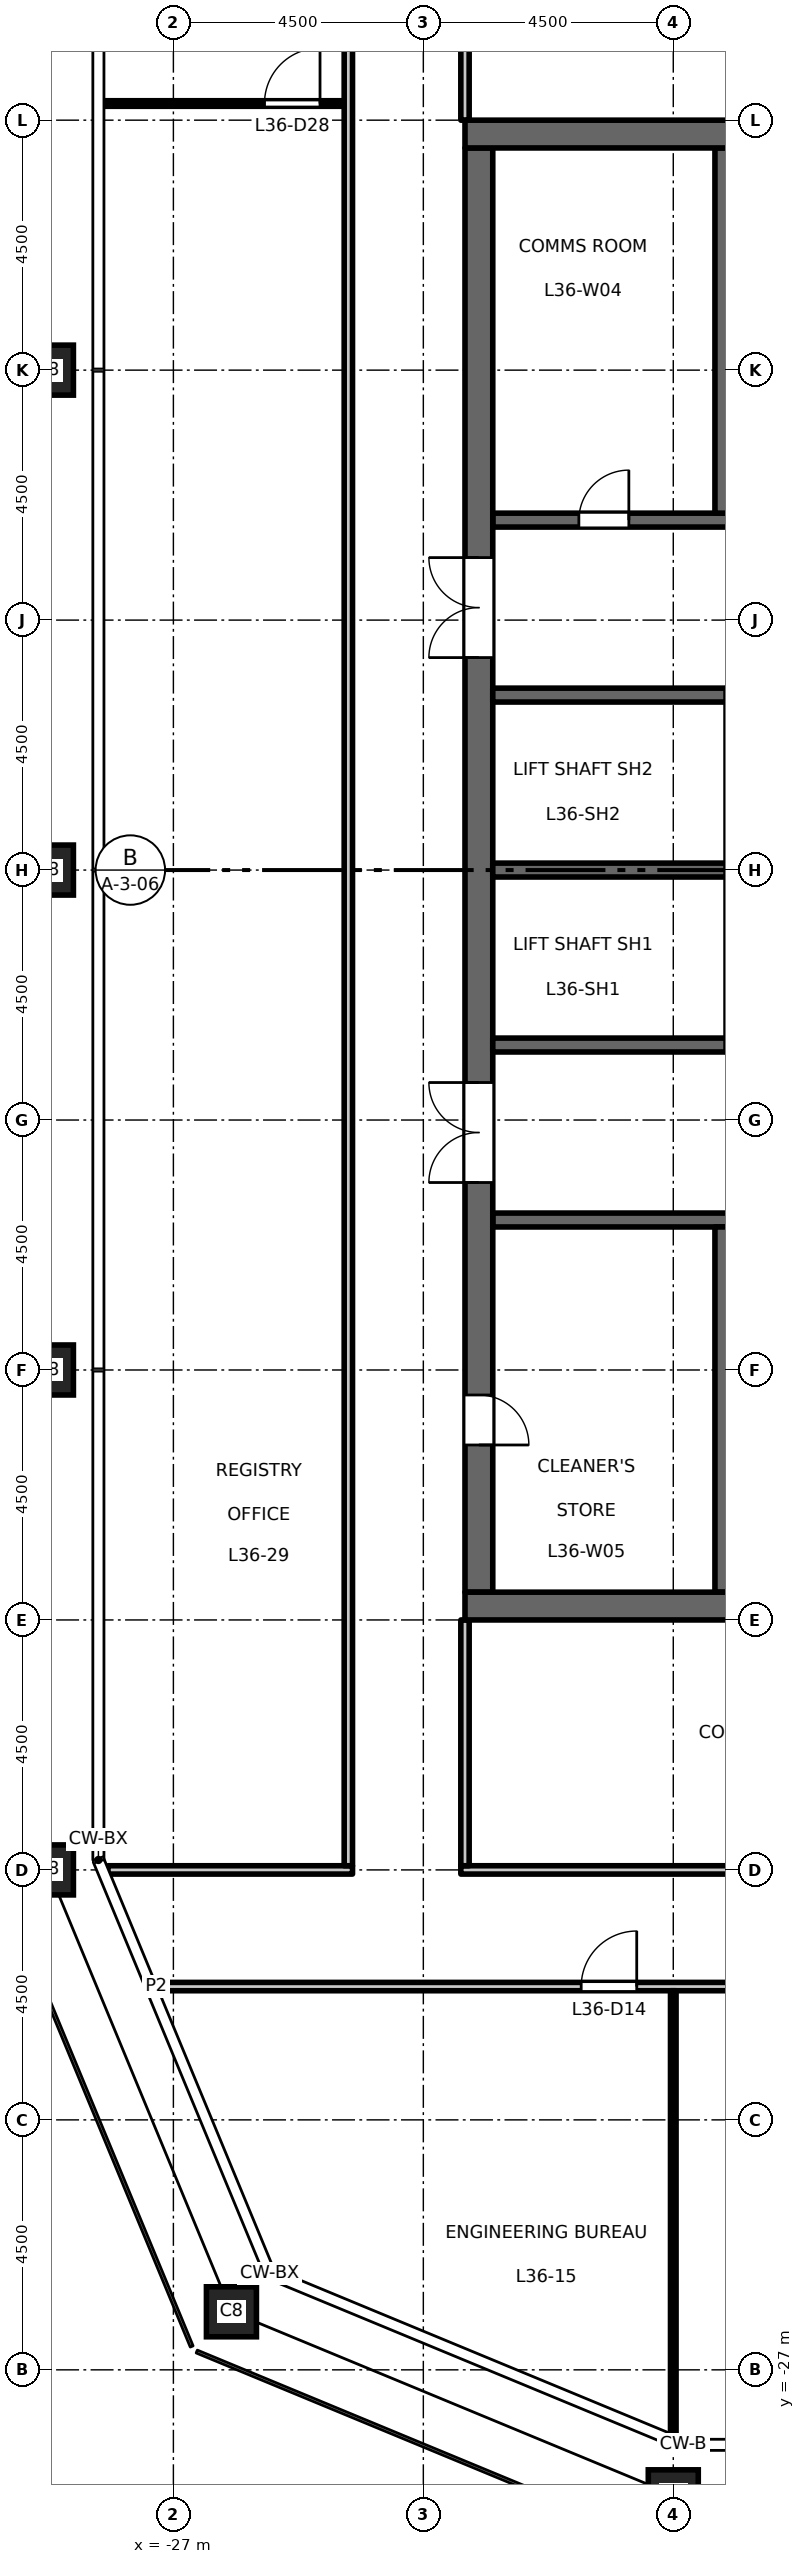
"""IFC4 building model, lengths in metres.
Left out: names, types, materials, properties, quantities, classifications, styles, units other than length and angle.
Written with IfcOpenShell. Run it as: python <this file> out.ifc"""

import sys

from ifc_helpers import new_model, si_unit, direction, frame, frame_2d, origin, origin_2d, place, context, subcontext, project, spatial, rectangle, hollow_rectangle, extrude, element, fill, save


model = new_model("IFC4")
c1 = context("Model", 3, precision=1e-05, world=origin(), true_north=direction((0.0, 1.0)))
c2 = subcontext(c1, "Body", "Model", "MODEL_VIEW")
j1 = project(units=[si_unit("LENGTHUNIT", "METRE"), si_unit("PLANEANGLEUNIT", "RADIAN")], contexts=[c1])
p1 = place(None, origin())
s1 = spatial("IfcSite", under=j1, at=p1, CompositionType="ELEMENT")
p2 = place(p1, origin())
s2 = spatial("IfcBuilding", under=s1, at=p2, CompositionType="ELEMENT")
p3 = place(p2, frame((0.0, 0.0, 167.7)))
s3 = spatial("IfcBuildingStorey", under=s2, at=p3, CompositionType="ELEMENT", Elevation=167.7)
for number, where, z_axis, x_axis in (
    (1, (-18.0, -29.25, 0.0), (0.0, 0.0, 1.0), (1.0, 0.0, 0.0)),
    (2, (-29.25, 9.0, 0.0), (0.0, 0.0, 1.0), (1.0, 0.0, 0.0)),
    (3, (-29.25, 0.0, 0.0), (0.0, 0.0, 1.0), (1.0, 0.0, 0.0)),
    (4, (-29.25, -9.0, 0.0), (0.0, 0.0, 1.0), (1.0, 0.0, 0.0)),
    (5, (-29.25, -18.0, 0.0), (0.0, 0.0, 1.0), (1.0, 0.0, 0.0)),
    (6, (-25.955, -25.955, 0.0), (0.0, 0.0, 1.0), (1.0, 0.0, 0.0)),
):
    element("IfcColumn", number, at=place(p3, frame(where, z_axis=z_axis, x_axis=x_axis)), inside=s3, PredefinedType="COLUMN", context=c2, shape_type="SweptSolid", body=[
        extrude(hollow_rectangle(XDim=0.9, YDim=0.9, WallThickness=0.05, at=origin_2d()), origin(), (0.0, 0.0, 1.0), 4.5),
    ])
p4 = place(p3, frame((-17.0, 6.3, 0.0), z_axis=(0.0, 0.0, 1.0), x_axis=(-1.0, 0.0, 0.0)))
e7 = element("IfcWall", 7, at=p4, inside=s3, PredefinedType="SHEAR", context=c2, shape_type="SweptSolid", body=[
    extrude(rectangle(XDim=4.25, YDim=0.25, at=frame_2d((2.125, 0.0))), origin(), (0.0, 0.0, 1.0), 4.35),
])
p5 = place(p4, frame((1.8, 0.0, 0.0)))
e8 = element("IfcOpeningElement", 8, at=p5, cuts=e7, PredefinedType="OPENING", context=c2, shape_type="SweptSolid", body=[
    extrude(rectangle(XDim=0.9, YDim=2.1, at=frame_2d((0.45, 1.05))), frame((0.0, 0.135, 0.0), z_axis=(0.0, -1.0, 0.0), x_axis=(1.0, 0.0, 0.0)), (0.0, 0.0, 1.0), 0.27),
])
p6 = place(p3, frame((-12.15, -6.3, 0.0), z_axis=(0.0, 0.0, 1.0), x_axis=(-1.0, 0.0, 0.0)))
e9 = element("IfcWall", 9, at=p6, inside=s3, PredefinedType="SHEAR", context=c2, shape_type="SweptSolid", body=[
    extrude(rectangle(XDim=9.1, YDim=0.25, at=frame_2d((4.55, 0.0))), origin(), (0.0, 0.0, 1.0), 4.35),
])
p7 = place(p6, frame((1.8, 0.0, 0.0)))
e10 = element("IfcOpeningElement", 10, at=p7, cuts=e9, PredefinedType="OPENING", context=c2, shape_type="SweptSolid", body=[
    extrude(rectangle(XDim=1.0, YDim=2.1, at=frame_2d((0.5, 1.05))), frame((0.0, 0.135, 0.0), z_axis=(0.0, -1.0, 0.0), x_axis=(1.0, 0.0, 0.0)), (0.0, 0.0, 1.0), 0.27),
])
p8 = place(p3, frame((-21.5, -13.0, 0.0), z_axis=(0.0, 0.0, 1.0), x_axis=(0.0, 1.0, 0.0)))
e11 = element("IfcWall", 11, at=p8, inside=s3, PredefinedType="SHEAR", context=c2, shape_type="SweptSolid", body=[
    extrude(rectangle(XDim=26.0, YDim=0.5, at=frame_2d((13.0, 0.0))), origin(), (0.0, 0.0, 1.0), 4.35),
])
p9 = place(p8, frame((16.825, 0.0, 0.0)))
e12 = element("IfcOpeningElement", 12, at=p9, cuts=e11, PredefinedType="OPENING", context=c2, shape_type="SweptSolid", body=[
    extrude(rectangle(XDim=1.8, YDim=2.1, at=frame_2d((0.9, 1.05))), frame((0.0, 0.26, 0.0), z_axis=(0.0, -1.0, 0.0), x_axis=(1.0, 0.0, 0.0)), (0.0, 0.0, 1.0), 0.52),
])
p10 = place(p8, frame((7.375, 0.0, 0.0)))
e13 = element("IfcOpeningElement", 13, at=p10, cuts=e11, PredefinedType="OPENING", context=c2, shape_type="SweptSolid", body=[
    extrude(rectangle(XDim=1.8, YDim=2.1, at=frame_2d((0.9, 1.05))), frame((0.0, 0.26, 0.0), z_axis=(0.0, -1.0, 0.0), x_axis=(1.0, 0.0, 0.0)), (0.0, 0.0, 1.0), 0.52),
])
p11 = place(p8, frame((2.65, 0.0, 0.0)))
e14 = element("IfcOpeningElement", 14, at=p11, cuts=e11, PredefinedType="OPENING", context=c2, shape_type="SweptSolid", body=[
    extrude(rectangle(XDim=0.9, YDim=2.1, at=frame_2d((0.45, 1.05))), frame((0.0, 0.26, 0.0), z_axis=(0.0, -1.0, 0.0), x_axis=(1.0, 0.0, 0.0)), (0.0, 0.0, 1.0), 0.52),
])
for number, where, z_axis, x_axis in (
    (15, (-17.05, 0.0, 0.0), (0.0, 0.0, 1.0), (-1.0, 0.0, 0.0)),
    (16, (-17.05, 3.15, 0.0), (0.0, 0.0, 1.0), (-1.0, 0.0, 0.0)),
    (17, (-17.05, -3.15, 0.0), (0.0, 0.0, 1.0), (-1.0, 0.0, 0.0)),
):
    element("IfcWall", number, at=place(p3, frame(where, z_axis=z_axis, x_axis=x_axis)), inside=s3, PredefinedType="SHEAR", context=c2, shape_type="SweptSolid", body=[
        extrude(rectangle(XDim=4.2, YDim=0.25, at=frame_2d((2.1, 0.0))), origin(), (0.0, 0.0, 1.0), 4.35),
    ])
for number, where, z_axis, x_axis in (
    (18, (-17.0, 6.425, 0.0), (0.0, 0.0, 1.0), (0.0, 1.0, 0.0)),
    (19, (-17.0, -13.0, 0.0), (0.0, 0.0, 1.0), (0.0, 1.0, 0.0)),
):
    element("IfcWall", number, at=place(p3, frame(where, z_axis=z_axis, x_axis=x_axis)), inside=s3, PredefinedType="SHEAR", context=c2, shape_type="SweptSolid", body=[
        extrude(rectangle(XDim=6.575, YDim=0.5, at=frame_2d((3.288, 0.0))), origin(), (0.0, 0.0, 1.0), 4.35),
    ])
for number, where, z_axis, x_axis in (
    (20, (-8.25, 13.25, 0.0), (0.0, 0.0, 1.0), (-1.0, 0.0, 0.0)),
    (21, (-8.25, -13.25, 0.0), (0.0, 0.0, 1.0), (-1.0, 0.0, 0.0)),
):
    element("IfcWall", number, at=place(p3, frame(where, z_axis=z_axis, x_axis=x_axis)), inside=s3, PredefinedType="SHEAR", context=c2, shape_type="SweptSolid", body=[
        extrude(rectangle(XDim=13.5, YDim=0.5, at=frame_2d((6.75, 0.0))), origin(), (0.0, 0.0, 1.0), 4.35),
    ])
p12 = place(p3, frame((-27.308, -20.1, 0.0), z_axis=(0.0, 0.0, 1.0), x_axis=(1.0, 0.0, 0.0)))
e22 = element("IfcWall", 22, at=p12, inside=s3, PredefinedType="PARTITIONING", context=c2, shape_type="SweptSolid", body=[
    extrude(rectangle(XDim=54.616, YDim=0.15, at=frame_2d((27.308, 0.0))), origin(), (0.0, 0.0, 1.0), 4.35),
])
p13 = place(p12, frame((16.708, 0.0, 0.0)))
e23 = element("IfcOpeningElement", 23, at=p13, cuts=e22, PredefinedType="OPENING", context=c2, shape_type="SweptSolid", body=[
    extrude(rectangle(XDim=1.0, YDim=2.1, at=frame_2d((0.5, 1.05))), frame((0.0, 0.085, 0.0), z_axis=(0.0, -1.0, 0.0), x_axis=(1.0, 0.0, 0.0)), (0.0, 0.0, 1.0), 0.17),
])
p14 = place(p12, frame((18.958, 0.0, 0.0)))
e24 = element("IfcOpeningElement", 24, at=p14, cuts=e22, PredefinedType="OPENING", context=c2, shape_type="SweptSolid", body=[
    extrude(rectangle(XDim=1.0, YDim=2.1, at=frame_2d((0.5, 1.05))), frame((0.0, 0.085, 0.0), z_axis=(0.0, -1.0, 0.0), x_axis=(1.0, 0.0, 0.0)), (0.0, 0.0, 1.0), 0.17),
])
p15 = place(p12, frame((34.708, 0.0, 0.0)))
e25 = element("IfcOpeningElement", 25, at=p15, cuts=e22, PredefinedType="OPENING", context=c2, shape_type="SweptSolid", body=[
    extrude(rectangle(XDim=1.0, YDim=2.1, at=frame_2d((0.5, 1.05))), frame((0.0, 0.085, 0.0), z_axis=(0.0, -1.0, 0.0), x_axis=(1.0, 0.0, 0.0)), (0.0, 0.0, 1.0), 0.17),
])
p16 = place(p12, frame((43.708, 0.0, 0.0)))
e26 = element("IfcOpeningElement", 26, at=p16, cuts=e22, PredefinedType="OPENING", context=c2, shape_type="SweptSolid", body=[
    extrude(rectangle(XDim=1.0, YDim=2.1, at=frame_2d((0.5, 1.05))), frame((0.0, 0.085, 0.0), z_axis=(0.0, -1.0, 0.0), x_axis=(1.0, 0.0, 0.0)), (0.0, 0.0, 1.0), 0.17),
])
p17 = place(p12, frame((7.65, 0.0, 0.0)))
e27 = element("IfcOpeningElement", 27, at=p17, cuts=e22, PredefinedType="OPENING", context=c2, shape_type="SweptSolid", body=[
    extrude(rectangle(XDim=1.0, YDim=2.1, at=frame_2d((0.5, 1.05))), frame((0.0, 0.085, 0.0), z_axis=(0.0, -1.0, 0.0), x_axis=(1.0, 0.0, 0.0)), (0.0, 0.0, 1.0), 0.17),
])
p18 = place(p12, frame((45.958, 0.0, 0.0)))
e28 = element("IfcOpeningElement", 28, at=p18, cuts=e22, PredefinedType="OPENING", context=c2, shape_type="SweptSolid", body=[
    extrude(rectangle(XDim=1.0, YDim=2.1, at=frame_2d((0.5, 1.05))), frame((0.0, 0.085, 0.0), z_axis=(0.0, -1.0, 0.0), x_axis=(1.0, 0.0, 0.0)), (0.0, 0.0, 1.0), 0.17),
])
p19 = place(p3, frame((-28.178, -18.0, 0.0), z_axis=(0.0, 0.0, 1.0), x_axis=(1.0, 0.0, 0.0)))
e29 = element("IfcWall", 29, at=p19, inside=s3, PredefinedType="PARTITIONING", context=c2, shape_type="SweptSolid", body=[
    extrude(rectangle(XDim=4.403, YDim=0.15, at=frame_2d((2.202, 0.0))), origin(), (0.0, 0.0, 1.0), 4.35),
])
p20 = place(p3, frame((-21.825, -18.0, 0.0), z_axis=(0.0, 0.0, 1.0), x_axis=(1.0, 0.0, 0.0)))
e30 = element("IfcWall", 30, at=p20, inside=s3, PredefinedType="PARTITIONING", context=c2, shape_type="SweptSolid", body=[
    extrude(rectangle(XDim=43.65, YDim=0.15, at=frame_2d((21.825, 0.0))), origin(), (0.0, 0.0, 1.0), 4.35),
])
p21 = place(p20, frame((14.175, 0.0, 0.0)))
e31 = element("IfcOpeningElement", 31, at=p21, cuts=e30, PredefinedType="OPENING", context=c2, shape_type="SweptSolid", body=[
    extrude(rectangle(XDim=1.0, YDim=2.1, at=frame_2d((0.5, 1.05))), frame((0.0, 0.085, 0.0), z_axis=(0.0, -1.0, 0.0), x_axis=(1.0, 0.0, 0.0)), (0.0, 0.0, 1.0), 0.17),
])
p22 = place(p20, frame((11.925, 0.0, 0.0)))
e32 = element("IfcOpeningElement", 32, at=p22, cuts=e30, PredefinedType="OPENING", context=c2, shape_type="SweptSolid", body=[
    extrude(rectangle(XDim=1.0, YDim=2.1, at=frame_2d((0.5, 1.05))), frame((0.0, 0.085, 0.0), z_axis=(0.0, -1.0, 0.0), x_axis=(1.0, 0.0, 0.0)), (0.0, 0.0, 1.0), 0.17),
])
p23 = place(p20, frame((30.675, 0.0, 0.0)))
e33 = element("IfcOpeningElement", 33, at=p23, cuts=e30, PredefinedType="OPENING", context=c2, shape_type="SweptSolid", body=[
    extrude(rectangle(XDim=1.0, YDim=2.1, at=frame_2d((0.5, 1.05))), frame((0.0, 0.085, 0.0), z_axis=(0.0, -1.0, 0.0), x_axis=(1.0, 0.0, 0.0)), (0.0, 0.0, 1.0), 0.17),
])
p24 = place(p3, frame((-28.26, 13.8, 0.0), z_axis=(0.0, 0.0, 1.0), x_axis=(1.0, 0.0, 0.0)))
e34 = element("IfcWall", 34, at=p24, inside=s3, PredefinedType="PARTITIONING", context=c2, shape_type="SweptSolid", body=[
    extrude(rectangle(XDim=4.335, YDim=0.1, at=frame_2d((2.167, 0.0))), origin(), (0.0, 0.0, 1.0), 4.35),
])
p25 = place(p24, frame((2.9, 0.0, 0.0)))
e35 = element("IfcOpeningElement", 35, at=p25, cuts=e34, PredefinedType="OPENING", context=c2, shape_type="SweptSolid", body=[
    extrude(rectangle(XDim=1.0, YDim=2.1, at=frame_2d((0.5, 1.05))), frame((0.0, 0.06, 0.0), z_axis=(0.0, -1.0, 0.0), x_axis=(1.0, 0.0, 0.0)), (0.0, 0.0, 1.0), 0.12),
])
p26 = place(p3, frame((-23.85, -17.925, 0.0), z_axis=(0.0, 0.0, 1.0), x_axis=(0.0, 1.0, 0.0)))
e36 = element("IfcWall", 36, at=p26, inside=s3, PredefinedType="PARTITIONING", context=c2, shape_type="SweptSolid", body=[
    extrude(rectangle(XDim=35.85, YDim=0.15, at=frame_2d((17.925, 0.0))), origin(), (0.0, 0.0, 1.0), 4.35),
])
for number, where, z_axis, x_axis in (
    (37, (-21.75, -17.925, 0.0), (0.0, 0.0, 1.0), (0.0, 1.0, 0.0)),
    (38, (-21.75, 13.5, 0.0), (0.0, 0.0, 1.0), (0.0, 1.0, 0.0)),
):
    element("IfcWall", number, at=place(p3, frame(where, z_axis=z_axis, x_axis=x_axis)), inside=s3, PredefinedType="PARTITIONING", context=c2, shape_type="SweptSolid", body=[
        extrude(rectangle(XDim=4.425, YDim=0.15, at=frame_2d((2.212, 0.0))), origin(), (0.0, 0.0, 1.0), 4.35),
    ])
p27 = place(p3, frame((-18.0, -28.178, 0.0), z_axis=(0.0, 0.0, 1.0), x_axis=(0.0, 1.0, 0.0)))
e39 = element("IfcWall", 39, at=p27, inside=s3, PredefinedType="PARTITIONING", context=c2, shape_type="SweptSolid", body=[
    extrude(rectangle(XDim=8.003, YDim=0.1, at=frame_2d((4.001, 0.0))), origin(), (0.0, 0.0, 1.0), 3.45),
])
p28 = place(p9, origin())
e40 = element("IfcDoor", 40, at=p28, inside=s3, OperationType="DOUBLE_DOOR_DOUBLE_SWING", PredefinedType="DOOR", context=c2, shape_type="SweptSolid", body=[
    extrude(rectangle(XDim=1.8, YDim=2.1, at=frame_2d((0.9, 1.05))), frame((0.0, 0.025, 0.0), z_axis=(0.0, -1.0, 0.0), x_axis=(1.0, 0.0, 0.0)), (0.0, 0.0, 1.0), 0.05),
])
fill(e12, e40)
p29 = place(p10, origin())
e41 = element("IfcDoor", 41, at=p29, inside=s3, OperationType="DOUBLE_DOOR_DOUBLE_SWING", PredefinedType="DOOR", context=c2, shape_type="SweptSolid", body=[
    extrude(rectangle(XDim=1.8, YDim=2.1, at=frame_2d((0.9, 1.05))), frame((0.0, 0.025, 0.0), z_axis=(0.0, -1.0, 0.0), x_axis=(1.0, 0.0, 0.0)), (0.0, 0.0, 1.0), 0.05),
])
fill(e13, e41)
p30 = place(p5, origin())
e42 = element("IfcDoor", 42, at=p30, inside=s3, OperationType="SINGLE_SWING_LEFT", PredefinedType="DOOR", context=c2, shape_type="SweptSolid", body=[
    extrude(rectangle(XDim=0.9, YDim=2.1, at=frame_2d((0.45, 1.05))), frame((0.0, 0.025, 0.0), z_axis=(0.0, -1.0, 0.0), x_axis=(1.0, 0.0, 0.0)), (0.0, 0.0, 1.0), 0.05),
])
fill(e8, e42)
p31 = place(p11, origin())
e43 = element("IfcDoor", 43, at=p31, inside=s3, OperationType="SINGLE_SWING_LEFT", PredefinedType="DOOR", context=c2, shape_type="SweptSolid", body=[
    extrude(rectangle(XDim=0.9, YDim=2.1, at=frame_2d((0.45, 1.05))), frame((0.0, 0.025, 0.0), z_axis=(0.0, -1.0, 0.0), x_axis=(1.0, 0.0, 0.0)), (0.0, 0.0, 1.0), 0.05),
])
fill(e14, e43)
p32 = place(p17, origin())
e44 = element("IfcDoor", 44, at=p32, inside=s3, OperationType="SINGLE_SWING_RIGHT", PredefinedType="DOOR", context=c2, shape_type="SweptSolid", body=[
    extrude(rectangle(XDim=1.0, YDim=2.1, at=frame_2d((0.5, 1.05))), frame((0.0, 0.025, 0.0), z_axis=(0.0, -1.0, 0.0), x_axis=(1.0, 0.0, 0.0)), (0.0, 0.0, 1.0), 0.05),
])
fill(e27, e44)
p33 = place(p25, origin())
e45 = element("IfcDoor", 45, at=p33, inside=s3, OperationType="SINGLE_SWING_RIGHT", PredefinedType="DOOR", context=c2, shape_type="SweptSolid", body=[
    extrude(rectangle(XDim=1.0, YDim=2.1, at=frame_2d((0.5, 1.05))), frame((0.0, 0.025, 0.0), z_axis=(0.0, -1.0, 0.0), x_axis=(1.0, 0.0, 0.0)), (0.0, 0.0, 1.0), 0.05),
])
fill(e35, e45)
save(model, sys.argv[1])
